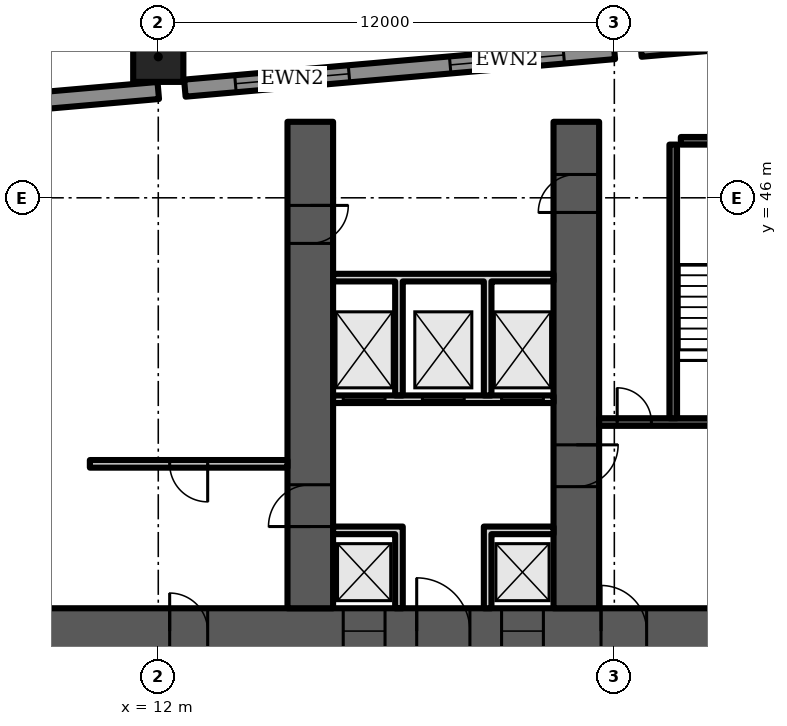
"""IFC4 building model, lengths in metres.
Left out: names, types, materials, properties, quantities, classifications, styles, units other than length and angle.
Written with IfcOpenShell. Run it as: python <this file> out.ifc"""

import sys

from ifc_helpers import new_model, si_unit, direction, frame, frame_2d, origin, origin_2d, place, context, subcontext, project, spatial, polyline, rectangle, outline, extrude, element, fill, save


model = new_model("IFC4")
c1 = context("Model", 3, precision=1e-05, world=origin(), true_north=direction((0.0, 1.0)))
c2 = subcontext(c1, "Body", "Model", "MODEL_VIEW")
j1 = project(units=[si_unit("LENGTHUNIT", "METRE"), si_unit("PLANEANGLEUNIT", "RADIAN")], contexts=[c1])
p1 = place(None, origin())
s1 = spatial("IfcSite", under=j1, at=p1, CompositionType="ELEMENT")
p2 = place(p1, origin())
s2 = spatial("IfcBuilding", under=s1, at=p2, CompositionType="ELEMENT")
p3 = place(p2, frame((0.0, 0.0, 15.0)))
s3 = spatial("IfcBuildingStorey", under=s2, at=p3, CompositionType="ELEMENT", Elevation=15.0)
p4 = place(p3, frame((12.0, 49.71, 0.0), z_axis=(0.0, 0.0, 1.0), x_axis=(1.0, 0.0, 0.0)))
e1 = element("IfcColumn", 1, at=p4, inside=s3, PredefinedType="COLUMN", context=c2, shape_type="SweptSolid", body=[
    extrude(rectangle(XDim=1.32, YDim=1.32, at=origin_2d()), origin(), (0.0, 0.0, 1.0), 6.5),
])
p5 = place(p3, frame((36.0, 50.924, 0.0), z_axis=(0.0, 0.0, 1.0), x_axis=(-0.996195, -0.087145, 0.0)))
e2 = element("IfcWall", 2, at=p5, inside=s3, PredefinedType="SOLIDWALL", context=c2, shape_type="SweptSolid", body=[
    extrude(rectangle(XDim=11.344, YDim=0.45, at=frame_2d((5.672, 0.0))), origin(), (0.0, 0.0, 1.0), 6.2),
])
p6 = place(p5, frame((1.336, 0.0, 1.0)))
e3 = element("IfcOpeningElement", 3, at=p6, cuts=e2, PredefinedType="OPENING", context=c2, shape_type="SweptSolid", body=[
    extrude(rectangle(XDim=3.0, YDim=4.2, at=frame_2d((1.5, 2.1))), frame((0.0, 0.235, 0.0), z_axis=(0.0, -1.0, 0.0), x_axis=(1.0, 0.0, 0.0)), (0.0, 0.0, 1.0), 0.47),
])
p7 = place(p5, frame((7.008, 0.0, 1.0)))
e4 = element("IfcOpeningElement", 4, at=p7, cuts=e2, PredefinedType="OPENING", context=c2, shape_type="SweptSolid", body=[
    extrude(rectangle(XDim=3.0, YDim=4.2, at=frame_2d((1.5, 2.1))), frame((0.0, 0.235, 0.0), z_axis=(0.0, -1.0, 0.0), x_axis=(1.0, 0.0, 0.0)), (0.0, 0.0, 1.0), 0.47),
])
p8 = place(p3, frame((24.0, 49.874, 0.0), z_axis=(0.0, 0.0, 1.0), x_axis=(-0.996195, -0.087145, 0.0)))
e5 = element("IfcWall", 5, at=p8, inside=s3, PredefinedType="SOLIDWALL", context=c2, shape_type="SweptSolid", body=[
    extrude(rectangle(XDim=11.344, YDim=0.45, at=frame_2d((5.672, 0.0))), origin(), (0.0, 0.0, 1.0), 6.2),
])
p9 = place(p8, frame((1.336, 0.0, 1.0)))
e6 = element("IfcOpeningElement", 6, at=p9, cuts=e5, PredefinedType="OPENING", context=c2, shape_type="SweptSolid", body=[
    extrude(rectangle(XDim=3.0, YDim=4.2, at=frame_2d((1.5, 2.1))), frame((0.0, 0.235, 0.0), z_axis=(0.0, -1.0, 0.0), x_axis=(1.0, 0.0, 0.0)), (0.0, 0.0, 1.0), 0.47),
])
p10 = place(p8, frame((7.008, 0.0, 1.0)))
e7 = element("IfcOpeningElement", 7, at=p10, cuts=e5, PredefinedType="OPENING", context=c2, shape_type="SweptSolid", body=[
    extrude(rectangle(XDim=3.0, YDim=4.2, at=frame_2d((1.5, 2.1))), frame((0.0, 0.235, 0.0), z_axis=(0.0, -1.0, 0.0), x_axis=(1.0, 0.0, 0.0)), (0.0, 0.0, 1.0), 0.47),
])
p11 = place(p3, frame((12.0, 48.824, 0.0), z_axis=(0.0, 0.0, 1.0), x_axis=(-0.9962, -0.087124, 0.0)))
e8 = element("IfcWall", 8, at=p11, inside=s3, PredefinedType="SOLIDWALL", context=c2, shape_type="SweptSolid", body=[
    extrude(rectangle(XDim=3.859, YDim=0.45, at=frame_2d((1.929, 0.0))), origin(), (0.0, 0.0, 1.0), 6.2),
])
p12 = place(p3, frame((9.0, 34.6, 0.0), z_axis=(0.0, 0.0, 1.0), x_axis=(1.0, 0.0, 0.0)))
e9 = element("IfcWall", 9, at=p12, inside=s3, PredefinedType="SHEAR", context=c2, shape_type="SweptSolid", body=[
    extrude(rectangle(XDim=56.0, YDim=1.2, at=frame_2d((28.0, 0.0))), origin(), (0.0, 0.0, 1.0), 6.2),
])
p13 = place(p12, frame((3.3, 0.0, 0.0)))
e10 = element("IfcOpeningElement", 10, at=p13, cuts=e9, PredefinedType="OPENING", context=c2, shape_type="SweptSolid", body=[
    extrude(rectangle(XDim=1.0, YDim=2.1, at=frame_2d((0.5, 1.05))), frame((0.0, 0.61, 0.0), z_axis=(0.0, -1.0, 0.0), x_axis=(1.0, 0.0, 0.0)), (0.0, 0.0, 1.0), 1.22),
])
p14 = place(p12, frame((7.867, 0.0, 0.0)))
e11 = element("IfcOpeningElement", 11, at=p14, cuts=e9, PredefinedType="OPENING", context=c2, shape_type="SweptSolid", body=[
    extrude(rectangle(XDim=1.1, YDim=2.1, at=frame_2d((0.55, 1.05))), frame((0.0, 0.61, 0.0), z_axis=(0.0, -1.0, 0.0), x_axis=(1.0, 0.0, 0.0)), (0.0, 0.0, 1.0), 1.22),
])
p15 = place(p12, frame((12.033, 0.0, 0.0)))
e12 = element("IfcOpeningElement", 12, at=p15, cuts=e9, PredefinedType="OPENING", context=c2, shape_type="SweptSolid", body=[
    extrude(rectangle(XDim=1.1, YDim=2.1, at=frame_2d((0.55, 1.05))), frame((0.0, 0.61, 0.0), z_axis=(0.0, -1.0, 0.0), x_axis=(1.0, 0.0, 0.0)), (0.0, 0.0, 1.0), 1.22),
])
p16 = place(p12, frame((9.8, 0.0, 0.0)))
e13 = element("IfcOpeningElement", 13, at=p16, cuts=e9, PredefinedType="OPENING", context=c2, shape_type="SweptSolid", body=[
    extrude(rectangle(XDim=1.4, YDim=2.1, at=frame_2d((0.7, 1.05))), frame((0.0, 0.61, 0.0), z_axis=(0.0, -1.0, 0.0), x_axis=(1.0, 0.0, 0.0)), (0.0, 0.0, 1.0), 1.22),
])
p17 = place(p12, frame((14.65, 0.0, 0.0)))
e14 = element("IfcOpeningElement", 14, at=p17, cuts=e9, PredefinedType="OPENING", context=c2, shape_type="SweptSolid", body=[
    extrude(rectangle(XDim=1.2, YDim=2.1, at=frame_2d((0.6, 1.05))), frame((0.0, 0.61, 0.0), z_axis=(0.0, -1.0, 0.0), x_axis=(1.0, 0.0, 0.0)), (0.0, 0.0, 1.0), 1.22),
])
p18 = place(p12, frame((21.867, 0.0, 0.0)))
e15 = element("IfcOpeningElement", 15, at=p18, cuts=e9, PredefinedType="OPENING", context=c2, shape_type="SweptSolid", body=[
    extrude(rectangle(XDim=1.1, YDim=2.1, at=frame_2d((0.55, 1.05))), frame((0.0, 0.61, 0.0), z_axis=(0.0, -1.0, 0.0), x_axis=(1.0, 0.0, 0.0)), (0.0, 0.0, 1.0), 1.22),
])
p19 = place(p12, frame((26.033, 0.0, 0.0)))
e16 = element("IfcOpeningElement", 16, at=p19, cuts=e9, PredefinedType="OPENING", context=c2, shape_type="SweptSolid", body=[
    extrude(rectangle(XDim=1.1, YDim=2.1, at=frame_2d((0.55, 1.05))), frame((0.0, 0.61, 0.0), z_axis=(0.0, -1.0, 0.0), x_axis=(1.0, 0.0, 0.0)), (0.0, 0.0, 1.0), 1.22),
])
p20 = place(p12, frame((23.8, 0.0, 0.0)))
e17 = element("IfcOpeningElement", 17, at=p20, cuts=e9, PredefinedType="OPENING", context=c2, shape_type="SweptSolid", body=[
    extrude(rectangle(XDim=1.4, YDim=2.1, at=frame_2d((0.7, 1.05))), frame((0.0, 0.61, 0.0), z_axis=(0.0, -1.0, 0.0), x_axis=(1.0, 0.0, 0.0)), (0.0, 0.0, 1.0), 1.22),
])
p21 = place(p12, frame((28.867, 0.0, 0.0)))
e18 = element("IfcOpeningElement", 18, at=p21, cuts=e9, PredefinedType="OPENING", context=c2, shape_type="SweptSolid", body=[
    extrude(rectangle(XDim=1.1, YDim=2.1, at=frame_2d((0.55, 1.05))), frame((0.0, 0.61, 0.0), z_axis=(0.0, -1.0, 0.0), x_axis=(1.0, 0.0, 0.0)), (0.0, 0.0, 1.0), 1.22),
])
p22 = place(p12, frame((33.033, 0.0, 0.0)))
e19 = element("IfcOpeningElement", 19, at=p22, cuts=e9, PredefinedType="OPENING", context=c2, shape_type="SweptSolid", body=[
    extrude(rectangle(XDim=1.1, YDim=2.1, at=frame_2d((0.55, 1.05))), frame((0.0, 0.61, 0.0), z_axis=(0.0, -1.0, 0.0), x_axis=(1.0, 0.0, 0.0)), (0.0, 0.0, 1.0), 1.22),
])
p23 = place(p12, frame((40.15, 0.0, 0.0)))
e20 = element("IfcOpeningElement", 20, at=p23, cuts=e9, PredefinedType="OPENING", context=c2, shape_type="SweptSolid", body=[
    extrude(rectangle(XDim=1.2, YDim=2.1, at=frame_2d((0.6, 1.05))), frame((0.0, 0.61, 0.0), z_axis=(0.0, -1.0, 0.0), x_axis=(1.0, 0.0, 0.0)), (0.0, 0.0, 1.0), 1.22),
])
p24 = place(p12, frame((44.8, 0.0, 0.0)))
e21 = element("IfcOpeningElement", 21, at=p24, cuts=e9, PredefinedType="OPENING", context=c2, shape_type="SweptSolid", body=[
    extrude(rectangle(XDim=1.4, YDim=2.1, at=frame_2d((0.7, 1.05))), frame((0.0, 0.61, 0.0), z_axis=(0.0, -1.0, 0.0), x_axis=(1.0, 0.0, 0.0)), (0.0, 0.0, 1.0), 1.22),
])
p25 = place(p12, frame((49.867, 0.0, 0.0)))
e22 = element("IfcOpeningElement", 22, at=p25, cuts=e9, PredefinedType="OPENING", context=c2, shape_type="SweptSolid", body=[
    extrude(rectangle(XDim=1.1, YDim=2.1, at=frame_2d((0.55, 1.05))), frame((0.0, 0.61, 0.0), z_axis=(0.0, -1.0, 0.0), x_axis=(1.0, 0.0, 0.0)), (0.0, 0.0, 1.0), 1.22),
])
p26 = place(p12, frame((53.5, 0.0, 0.0)))
e23 = element("IfcOpeningElement", 23, at=p26, cuts=e9, PredefinedType="OPENING", context=c2, shape_type="SweptSolid", body=[
    extrude(rectangle(XDim=1.1, YDim=2.1, at=frame_2d((0.55, 1.05))), frame((0.0, 0.61, 0.0), z_axis=(0.0, -1.0, 0.0), x_axis=(1.0, 0.0, 0.0)), (0.0, 0.0, 1.0), 1.22),
])
p27 = place(p12, frame((51.567, 0.0, 0.0)))
e24 = element("IfcOpeningElement", 24, at=p27, cuts=e9, PredefinedType="OPENING", context=c2, shape_type="SweptSolid", body=[
    extrude(rectangle(XDim=1.4, YDim=2.1, at=frame_2d((0.7, 1.05))), frame((0.0, 0.61, 0.0), z_axis=(0.0, -1.0, 0.0), x_axis=(1.0, 0.0, 0.0)), (0.0, 0.0, 1.0), 1.22),
])
p28 = place(p3, frame((16.0, 35.2, 0.0), z_axis=(0.0, 0.0, 1.0), x_axis=(0.0, 1.0, 0.0)))
e25 = element("IfcWall", 25, at=p28, inside=s3, PredefinedType="SHEAR", context=c2, shape_type="SweptSolid", body=[
    extrude(rectangle(XDim=12.8, YDim=1.2, at=frame_2d((6.4, 0.0))), origin(), (0.0, 0.0, 1.0), 6.2),
])
p29 = place(p28, frame((2.15, 0.0, 0.0)))
e26 = element("IfcOpeningElement", 26, at=p29, cuts=e25, PredefinedType="OPENING", context=c2, shape_type="SweptSolid", body=[
    extrude(rectangle(XDim=1.1, YDim=2.1, at=frame_2d((0.55, 1.05))), frame((0.0, 0.61, 0.0), z_axis=(0.0, -1.0, 0.0), x_axis=(1.0, 0.0, 0.0)), (0.0, 0.0, 1.0), 1.22),
])
p30 = place(p28, frame((9.6, 0.0, 0.0)))
e27 = element("IfcOpeningElement", 27, at=p30, cuts=e25, PredefinedType="OPENING", context=c2, shape_type="SweptSolid", body=[
    extrude(rectangle(XDim=1.0, YDim=2.1, at=frame_2d((0.5, 1.05))), frame((0.0, 0.61, 0.0), z_axis=(0.0, -1.0, 0.0), x_axis=(1.0, 0.0, 0.0)), (0.0, 0.0, 1.0), 1.22),
])
p31 = place(p3, frame((23.0, 35.2, 0.0), z_axis=(0.0, 0.0, 1.0), x_axis=(0.0, 1.0, 0.0)))
e28 = element("IfcWall", 28, at=p31, inside=s3, PredefinedType="SHEAR", context=c2, shape_type="SweptSolid", body=[
    extrude(rectangle(XDim=12.8, YDim=1.2, at=frame_2d((6.4, 0.0))), origin(), (0.0, 0.0, 1.0), 6.2),
])
p32 = place(p31, frame((10.414, 0.0, 0.0)))
e29 = element("IfcOpeningElement", 29, at=p32, cuts=e28, PredefinedType="OPENING", context=c2, shape_type="SweptSolid", body=[
    extrude(rectangle(XDim=1.0, YDim=2.1, at=frame_2d((0.5, 1.05))), frame((0.0, 0.61, 0.0), z_axis=(0.0, -1.0, 0.0), x_axis=(1.0, 0.0, 0.0)), (0.0, 0.0, 1.0), 1.22),
])
p33 = place(p31, frame((3.2, 0.0, 0.0)))
e30 = element("IfcOpeningElement", 30, at=p33, cuts=e28, PredefinedType="OPENING", context=c2, shape_type="SweptSolid", body=[
    extrude(rectangle(XDim=1.1, YDim=2.1, at=frame_2d((0.55, 1.05))), frame((0.0, 0.61, 0.0), z_axis=(0.0, -1.0, 0.0), x_axis=(1.0, 0.0, 0.0)), (0.0, 0.0, 1.0), 1.22),
])
p34 = place(p3, frame((10.2, 39.0, 0.0), z_axis=(0.0, 0.0, 1.0), x_axis=(1.0, 0.0, 0.0)))
e31 = element("IfcWall", 31, at=p34, inside=s3, PredefinedType="PARTITIONING", context=c2, shape_type="SweptSolid", body=[
    extrude(rectangle(XDim=5.2, YDim=0.2, at=frame_2d((2.6, 0.0))), origin(), (0.0, 0.0, 1.0), 6.2),
])
p35 = place(p34, frame((2.1, 0.0, 0.0)))
e32 = element("IfcOpeningElement", 32, at=p35, cuts=e31, PredefinedType="OPENING", context=c2, shape_type="SweptSolid", body=[
    extrude(rectangle(XDim=1.0, YDim=2.1, at=frame_2d((0.5, 1.05))), frame((0.0, 0.11, 0.0), z_axis=(0.0, -1.0, 0.0), x_axis=(1.0, 0.0, 0.0)), (0.0, 0.0, 1.0), 0.22),
])
p36 = place(p3, frame((16.6, 40.7, 0.0), z_axis=(0.0, 0.0, 1.0), x_axis=(1.0, 0.0, 0.0)))
e33 = element("IfcWall", 33, at=p36, inside=s3, PredefinedType="PARTITIONING", context=c2, shape_type="SweptSolid", body=[
    extrude(rectangle(XDim=5.8, YDim=0.2, at=frame_2d((2.9, 0.0))), origin(), (0.0, 0.0, 1.0), 6.2),
])
p37 = place(p36, frame((0.267, 0.0, 0.0)))
e34 = element("IfcOpeningElement", 34, at=p37, cuts=e33, PredefinedType="OPENING", context=c2, shape_type="SweptSolid", body=[
    extrude(rectangle(XDim=1.1, YDim=2.1, at=frame_2d((0.55, 1.05))), frame((0.0, 0.11, 0.0), z_axis=(0.0, -1.0, 0.0), x_axis=(1.0, 0.0, 0.0)), (0.0, 0.0, 1.0), 0.22),
])
p38 = place(p36, frame((2.35, 0.0, 0.0)))
e35 = element("IfcOpeningElement", 35, at=p38, cuts=e33, PredefinedType="OPENING", context=c2, shape_type="SweptSolid", body=[
    extrude(rectangle(XDim=1.1, YDim=2.1, at=frame_2d((0.55, 1.05))), frame((0.0, 0.11, 0.0), z_axis=(0.0, -1.0, 0.0), x_axis=(1.0, 0.0, 0.0)), (0.0, 0.0, 1.0), 0.22),
])
p39 = place(p36, frame((4.433, 0.0, 0.0)))
e36 = element("IfcOpeningElement", 36, at=p39, cuts=e33, PredefinedType="OPENING", context=c2, shape_type="SweptSolid", body=[
    extrude(rectangle(XDim=1.1, YDim=2.1, at=frame_2d((0.55, 1.05))), frame((0.0, 0.11, 0.0), z_axis=(0.0, -1.0, 0.0), x_axis=(1.0, 0.0, 0.0)), (0.0, 0.0, 1.0), 0.22),
])
p40 = place(p3, frame((0.0, 0.0, -0.0)))
e37 = element("IfcWall", 37, at=p40, inside=s3, PredefinedType="PARTITIONING", context=c2, shape_type="SweptSolid", body=[
    extrude(outline(polyline([(18.233, 37.15), (16.6, 37.15), (16.6, 37.35), (18.233, 37.35), (18.433, 37.35), (18.433, 35.2), (18.233, 35.2), (18.233, 37.15)])), origin(), (0.0, 0.0, 1.0), 6.2),
])
p41 = place(p3, frame((0.0, 0.0, -0.0)))
e38 = element("IfcWall", 38, at=p41, inside=s3, PredefinedType="PARTITIONING", context=c2, shape_type="SweptSolid", body=[
    extrude(outline(polyline([(20.567, 37.35), (20.767, 37.35), (22.4, 37.35), (22.4, 37.15), (20.767, 37.15), (20.767, 35.2), (20.567, 35.2), (20.567, 37.35)])), origin(), (0.0, 0.0, 1.0), 6.2),
])
p42 = place(p3, frame((0.0, 0.0, -0.0)))
e39 = element("IfcWall", 39, at=p42, inside=s3, PredefinedType="PARTITIONING", context=c2, shape_type="SweptSolid", body=[
    extrude(outline(polyline([(18.433, 40.8), (18.233, 40.8), (18.233, 43.8), (16.6, 43.8), (16.6, 44.0), (22.4, 44.0), (22.4, 43.8), (20.767, 43.8), (20.767, 40.8), (20.567, 40.8), (20.567, 43.8), (18.433, 43.8), (18.433, 40.8)])), origin(), (0.0, 0.0, 1.0), 6.2),
])
p43 = place(p3, frame((23.6, 40.1, 0.0), z_axis=(0.0, 0.0, 1.0), x_axis=(1.0, 0.0, 0.0)))
e40 = element("IfcWall", 40, at=p43, inside=s3, PredefinedType="SHEAR", context=c2, shape_type="SweptSolid", body=[
    extrude(rectangle(XDim=5.8, YDim=0.2, at=frame_2d((2.9, 0.0))), origin(), (0.0, 0.0, 1.0), 6.2),
])
p44 = place(p43, frame((3.325, 0.0, 0.0)))
e41 = element("IfcOpeningElement", 41, at=p44, cuts=e40, PredefinedType="OPENING", context=c2, shape_type="SweptSolid", body=[
    extrude(rectangle(XDim=1.2, YDim=2.1, at=frame_2d((0.6, 1.05))), frame((0.0, 0.11, 0.0), z_axis=(0.0, -1.0, 0.0), x_axis=(1.0, 0.0, 0.0)), (0.0, 0.0, 1.0), 0.22),
])
p45 = place(p43, frame((0.475, 0.0, 0.0)))
e42 = element("IfcOpeningElement", 42, at=p45, cuts=e40, PredefinedType="OPENING", context=c2, shape_type="SweptSolid", body=[
    extrude(rectangle(XDim=0.9, YDim=2.1, at=frame_2d((0.45, 1.05))), frame((0.0, 0.11, 0.0), z_axis=(0.0, -1.0, 0.0), x_axis=(1.0, 0.0, 0.0)), (0.0, 0.0, 1.0), 0.22),
])
p46 = place(p3, frame((25.55, 40.2, 0.0), z_axis=(0.0, 0.0, 1.0), x_axis=(0.0, 1.0, 0.0)))
e43 = element("IfcWall", 43, at=p46, inside=s3, PredefinedType="SHEAR", context=c2, shape_type="SweptSolid", body=[
    extrude(rectangle(XDim=7.2, YDim=0.2, at=frame_2d((3.6, 0.0))), origin(), (0.0, 0.0, 1.0), 6.2),
])
p47 = place(p3, frame((25.75, 47.5, 0.0), z_axis=(0.0, 0.0, 1.0), x_axis=(1.0, 0.0, 0.0)))
e44 = element("IfcWall", 44, at=p47, inside=s3, PredefinedType="SHEAR", context=c2, shape_type="SweptSolid", body=[
    extrude(rectangle(XDim=3.65, YDim=0.2, at=frame_2d((1.825, 0.0))), origin(), (0.0, 0.0, 1.0), 6.2),
])
p48 = place(p9, origin())
e45 = element("IfcWindow", 45, at=p48, inside=s3, PartitioningType="SINGLE_PANEL", PredefinedType="WINDOW", context=c2, shape_type="SweptSolid", body=[
    extrude(rectangle(XDim=3.0, YDim=4.2, at=frame_2d((1.5, 2.1))), frame((0.0, 0.105, 0.0), z_axis=(0.0, -1.0, 0.0), x_axis=(1.0, 0.0, 0.0)), (0.0, 0.0, 1.0), 0.06),
])
fill(e6, e45)
p49 = place(p10, origin())
e46 = element("IfcWindow", 46, at=p49, inside=s3, PartitioningType="SINGLE_PANEL", PredefinedType="WINDOW", context=c2, shape_type="SweptSolid", body=[
    extrude(rectangle(XDim=3.0, YDim=4.2, at=frame_2d((1.5, 2.1))), frame((0.0, 0.105, 0.0), z_axis=(0.0, -1.0, 0.0), x_axis=(1.0, 0.0, 0.0)), (0.0, 0.0, 1.0), 0.06),
])
fill(e7, e46)
p50 = place(p13, origin())
e47 = element("IfcDoor", 47, at=p50, inside=s3, OperationType="SINGLE_SWING_LEFT", PredefinedType="DOOR", context=c2, shape_type="SweptSolid", body=[
    extrude(rectangle(XDim=1.0, YDim=2.1, at=frame_2d((0.5, 1.05))), frame((0.0, 0.6, 0.0), z_axis=(0.0, -1.0, 0.0), x_axis=(1.0, 0.0, 0.0)), (0.0, 0.0, 1.0), 1.199),
])
fill(e10, e47)
p51 = place(p35, origin())
e48 = element("IfcDoor", 48, at=p51, inside=s3, OperationType="SINGLE_SWING_RIGHT", PredefinedType="DOOR", context=c2, shape_type="SweptSolid", body=[
    extrude(rectangle(XDim=1.0, YDim=2.1, at=frame_2d((0.5, 1.05))), frame((0.0, 0.025, 0.0), z_axis=(0.0, -1.0, 0.0), x_axis=(1.0, 0.0, 0.0)), (0.0, 0.0, 1.0), 0.05),
])
fill(e32, e48)
p52 = place(p14, origin())
e49 = element("IfcDoor", 49, at=p52, inside=s3, OperationType="DOUBLE_DOOR_SLIDING", PredefinedType="DOOR", context=c2, shape_type="SweptSolid", body=[
    extrude(rectangle(XDim=1.1, YDim=2.1, at=frame_2d((0.55, 1.05))), frame((0.0, 0.025, 0.0), z_axis=(0.0, -1.0, 0.0), x_axis=(1.0, 0.0, 0.0)), (0.0, 0.0, 1.0), 0.05),
])
fill(e11, e49)
p53 = place(p15, origin())
e50 = element("IfcDoor", 50, at=p53, inside=s3, OperationType="DOUBLE_DOOR_SLIDING", PredefinedType="DOOR", context=c2, shape_type="SweptSolid", body=[
    extrude(rectangle(XDim=1.1, YDim=2.1, at=frame_2d((0.55, 1.05))), frame((0.0, 0.025, 0.0), z_axis=(0.0, -1.0, 0.0), x_axis=(1.0, 0.0, 0.0)), (0.0, 0.0, 1.0), 0.05),
])
fill(e12, e50)
p54 = place(p16, origin())
e51 = element("IfcDoor", 51, at=p54, inside=s3, OperationType="DOUBLE_DOOR_SINGLE_SWING", PredefinedType="DOOR", context=c2, shape_type="SweptSolid", body=[
    extrude(rectangle(XDim=1.4, YDim=2.1, at=frame_2d((0.7, 1.05))), frame((0.0, 0.025, 0.0), z_axis=(0.0, -1.0, 0.0), x_axis=(1.0, 0.0, 0.0)), (0.0, 0.0, 1.0), 0.05),
])
fill(e13, e51)
p55 = place(p37, origin())
e52 = element("IfcDoor", 52, at=p55, inside=s3, OperationType="DOUBLE_DOOR_SLIDING", PredefinedType="DOOR", context=c2, shape_type="SweptSolid", body=[
    extrude(rectangle(XDim=1.1, YDim=2.1, at=frame_2d((0.55, 1.05))), frame((0.0, 0.025, 0.0), z_axis=(0.0, -1.0, 0.0), x_axis=(1.0, 0.0, 0.0)), (0.0, 0.0, 1.0), 0.05),
])
fill(e34, e52)
p56 = place(p38, origin())
e53 = element("IfcDoor", 53, at=p56, inside=s3, OperationType="DOUBLE_DOOR_SLIDING", PredefinedType="DOOR", context=c2, shape_type="SweptSolid", body=[
    extrude(rectangle(XDim=1.1, YDim=2.1, at=frame_2d((0.55, 1.05))), frame((0.0, 0.025, 0.0), z_axis=(0.0, -1.0, 0.0), x_axis=(1.0, 0.0, 0.0)), (0.0, 0.0, 1.0), 0.05),
])
fill(e35, e53)
p57 = place(p39, origin())
e54 = element("IfcDoor", 54, at=p57, inside=s3, OperationType="DOUBLE_DOOR_SLIDING", PredefinedType="DOOR", context=c2, shape_type="SweptSolid", body=[
    extrude(rectangle(XDim=1.1, YDim=2.1, at=frame_2d((0.55, 1.05))), frame((0.0, 0.025, 0.0), z_axis=(0.0, -1.0, 0.0), x_axis=(1.0, 0.0, 0.0)), (0.0, 0.0, 1.0), 0.05),
])
fill(e36, e54)
p58 = place(p32, origin())
e55 = element("IfcDoor", 55, at=p58, inside=s3, OperationType="SINGLE_SWING_LEFT", PredefinedType="DOOR", context=c2, shape_type="SweptSolid", body=[
    extrude(rectangle(XDim=1.0, YDim=2.1, at=frame_2d((0.5, 1.05))), frame((0.0, 0.6, 0.0), z_axis=(0.0, -1.0, 0.0), x_axis=(1.0, 0.0, 0.0)), (0.0, 0.0, 1.0), 1.199),
])
fill(e29, e55)
p59 = place(p45, origin())
e56 = element("IfcDoor", 56, at=p59, inside=s3, OperationType="SINGLE_SWING_LEFT", PredefinedType="DOOR", context=c2, shape_type="SweptSolid", body=[
    extrude(rectangle(XDim=0.9, YDim=2.1, at=frame_2d((0.45, 1.05))), frame((0.0, 0.025, 0.0), z_axis=(0.0, -1.0, 0.0), x_axis=(1.0, 0.0, 0.0)), (0.0, 0.0, 1.0), 0.05),
])
fill(e42, e56)
p60 = place(p17, origin())
e57 = element("IfcDoor", 57, at=p60, inside=s3, OperationType="SINGLE_SWING_LEFT", PredefinedType="DOOR", context=c2, shape_type="SweptSolid", body=[
    extrude(rectangle(XDim=1.2, YDim=2.1, at=frame_2d((0.6, 1.05))), frame((0.0, 0.025, 0.0), z_axis=(0.0, -1.0, 0.0), x_axis=(1.0, 0.0, 0.0)), (0.0, 0.0, 1.0), 0.05),
])
fill(e14, e57)
p61 = place(p29, origin())
e58 = element("IfcDoor", 58, at=p61, inside=s3, OperationType="SINGLE_SWING_LEFT", PredefinedType="DOOR", context=c2, shape_type="SweptSolid", body=[
    extrude(rectangle(XDim=1.1, YDim=2.1, at=frame_2d((0.55, 1.05))), frame((0.0, 0.025, 0.0), z_axis=(0.0, -1.0, 0.0), x_axis=(1.0, 0.0, 0.0)), (0.0, 0.0, 1.0), 0.05),
])
fill(e26, e58)
p62 = place(p30, origin())
e59 = element("IfcDoor", 59, at=p62, inside=s3, OperationType="SINGLE_SWING_RIGHT", PredefinedType="DOOR", context=c2, shape_type="SweptSolid", body=[
    extrude(rectangle(XDim=1.0, YDim=2.1, at=frame_2d((0.5, 1.05))), frame((0.0, 0.6, 0.0), z_axis=(0.0, -1.0, 0.0), x_axis=(1.0, 0.0, 0.0)), (0.0, 0.0, 1.0), 1.199),
])
fill(e27, e59)
p63 = place(p33, origin())
e60 = element("IfcDoor", 60, at=p63, inside=s3, OperationType="SINGLE_SWING_RIGHT", PredefinedType="DOOR", context=c2, shape_type="SweptSolid", body=[
    extrude(rectangle(XDim=1.1, YDim=2.1, at=frame_2d((0.55, 1.05))), frame((0.0, 0.025, 0.0), z_axis=(0.0, -1.0, 0.0), x_axis=(1.0, 0.0, 0.0)), (0.0, 0.0, 1.0), 0.05),
])
fill(e30, e60)
save(model, sys.argv[1])
